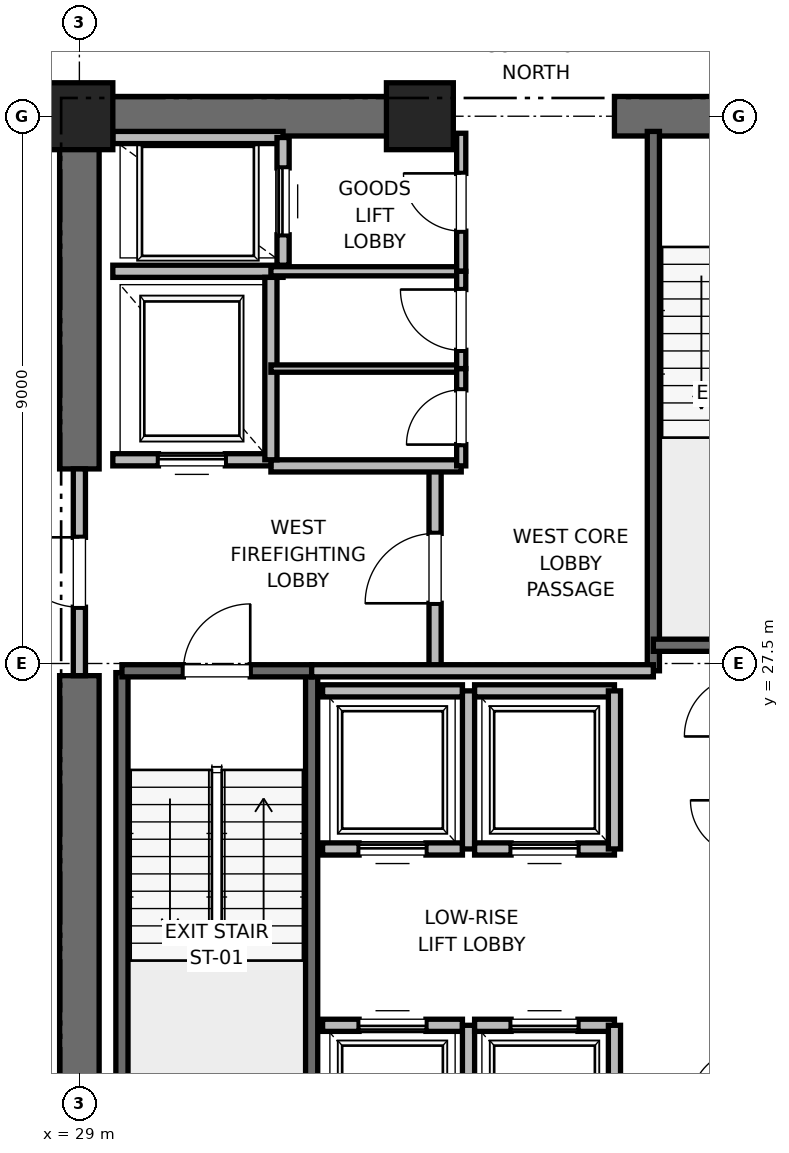
"""IFC4 building model, lengths in metres.
Left out: names, types, materials, properties, quantities, classifications, styles, units other than length and angle.
Written with IfcOpenShell. Run it as: python <this file> out.ifc"""

import sys

from ifc_helpers import new_model, si_unit, direction, frame, frame_2d, origin, origin_2d, place, context, subcontext, project, spatial, rectangle, extrude, element, fill, save


model = new_model("IFC4")
c1 = context("Model", 3, precision=1e-05, world=origin(), true_north=direction((0.0, 1.0)))
c2 = subcontext(c1, "Body", "Model", "MODEL_VIEW")
j1 = project(units=[si_unit("LENGTHUNIT", "METRE"), si_unit("PLANEANGLEUNIT", "RADIAN")], contexts=[c1])
p1 = place(None, origin())
s1 = spatial("IfcSite", under=j1, at=p1, CompositionType="ELEMENT")
p2 = place(p1, origin())
s2 = spatial("IfcBuilding", under=s1, at=p2, CompositionType="ELEMENT")
p3 = place(p2, frame((0.0, 0.0, 99.6)))
s3 = spatial("IfcBuildingStorey", under=s2, at=p3, CompositionType="ELEMENT", Elevation=99.6)
for number, where, z_axis, x_axis in (
    (1, (29.0, 36.5, 0.0), (0.0, 0.0, 1.0), (1.0, 0.0, 0.0)),
    (2, (34.6, 36.5, 0.0), (0.0, 0.0, 1.0), (1.0, 0.0, 0.0)),
):
    element("IfcColumn", number, at=place(p3, frame(where, z_axis=z_axis, x_axis=x_axis)), inside=s3, PredefinedType="PILASTER", context=c2, shape_type="SweptSolid", body=[
        extrude(rectangle(XDim=1.1, YDim=1.1, at=origin_2d()), origin(), (0.0, 0.0, 1.0), 4.0),
    ])
p4 = place(p3, frame((29.0, 36.5, 0.0), z_axis=(0.0, 0.0, 1.0), x_axis=(1.0, 0.0, 0.0)))
e3 = element("IfcWall", 3, at=p4, inside=s3, PredefinedType="SHEAR", context=c2, shape_type="SweptSolid", body=[
    extrude(rectangle(XDim=5.8, YDim=0.65, at=frame_2d((2.9, 0.0))), origin(), (0.0, 0.0, 1.0), 3.76),
])
p5 = place(p3, frame((37.8, 36.5, 0.0), z_axis=(0.0, 0.0, 1.0), x_axis=(1.0, 0.0, 0.0)))
e4 = element("IfcWall", 4, at=p5, inside=s3, PredefinedType="SHEAR", context=c2, shape_type="SweptSolid", body=[
    extrude(rectangle(XDim=4.4, YDim=0.65, at=frame_2d((2.2, 0.0))), origin(), (0.0, 0.0, 1.0), 3.76),
])
p6 = place(p5, frame((1.65, 0.0, 0.0)))
e5 = element("IfcOpeningElement", 5, at=p6, cuts=e4, PredefinedType="OPENING", context=c2, shape_type="SweptSolid", body=[
    extrude(rectangle(XDim=1.1, YDim=2.15, at=frame_2d((0.55, 1.075))), frame((0.0, 0.325, 0.0), z_axis=(0.0, -1.0, 0.0), x_axis=(1.0, 0.0, 0.0)), (0.0, 0.0, 1.0), 0.65),
])
p7 = place(p3, frame((29.0, 18.5, 0.0), z_axis=(0.0, 0.0, 1.0), x_axis=(0.0, 1.0, 0.0)))
e6 = element("IfcWall", 6, at=p7, inside=s3, PredefinedType="SHEAR", context=c2, shape_type="SweptSolid", body=[
    extrude(rectangle(XDim=8.8, YDim=0.65, at=frame_2d((4.4, 0.0))), origin(), (0.0, 0.0, 1.0), 3.76),
])
p8 = place(p3, frame((29.0, 30.7, 0.0), z_axis=(0.0, 0.0, 1.0), x_axis=(0.0, 1.0, 0.0)))
e7 = element("IfcWall", 7, at=p8, inside=s3, PredefinedType="SHEAR", context=c2, shape_type="SweptSolid", body=[
    extrude(rectangle(XDim=5.8, YDim=0.65, at=frame_2d((2.9, 0.0))), origin(), (0.0, 0.0, 1.0), 3.76),
])
p9 = place(p3, frame((29.7, 19.2, 0.0), z_axis=(0.0, 0.0, 1.0), x_axis=(0.0, 1.0, 0.0)))
e8 = element("IfcWall", 8, at=p9, inside=s3, PredefinedType="SOLIDWALL", context=c2, shape_type="SweptSolid", body=[
    extrude(rectangle(XDim=8.15, YDim=0.2, at=frame_2d((4.075, 0.0))), origin(), (0.0, 0.0, 1.0), 3.76),
])
p10 = place(p3, frame((32.82, 18.6, 0.0), z_axis=(0.0, 0.0, 1.0), x_axis=(0.0, 1.0, 0.0)))
e9 = element("IfcWall", 9, at=p10, inside=s3, PredefinedType="SOLIDWALL", context=c2, shape_type="SweptSolid", body=[
    extrude(rectangle(XDim=8.78, YDim=0.2, at=frame_2d((4.39, 0.0))), origin(), (0.0, 0.0, 1.0), 3.76),
])
p11 = place(p3, frame((29.7, 27.38, 0.0), z_axis=(0.0, 0.0, 1.0), x_axis=(1.0, 0.0, 0.0)))
e10 = element("IfcWall", 10, at=p11, inside=s3, PredefinedType="SOLIDWALL", context=c2, shape_type="SweptSolid", body=[
    extrude(rectangle(XDim=3.12, YDim=0.2, at=frame_2d((1.56, 0.0))), origin(), (0.0, 0.0, 1.0), 3.76),
])
p12 = place(p11, frame((1.01, 0.0, 0.0)))
e11 = element("IfcOpeningElement", 11, at=p12, cuts=e10, PredefinedType="OPENING", context=c2, shape_type="SweptSolid", body=[
    extrude(rectangle(XDim=1.1, YDim=2.15, at=frame_2d((0.55, 1.075))), frame((0.0, 0.1, 0.0), z_axis=(0.0, -1.0, 0.0), x_axis=(1.0, 0.0, 0.0)), (0.0, 0.0, 1.0), 0.2),
])
p13 = place(p3, frame((38.44, 27.38, 0.0), z_axis=(0.0, 0.0, 1.0), x_axis=(0.0, 1.0, 0.0)))
e12 = element("IfcWall", 12, at=p13, inside=s3, PredefinedType="SOLIDWALL", context=c2, shape_type="SweptSolid", body=[
    extrude(rectangle(XDim=8.87, YDim=0.2, at=frame_2d((4.435, 0.0))), origin(), (0.0, 0.0, 1.0), 3.76),
])
p14 = place(p3, frame((38.44, 27.8, 0.0), z_axis=(0.0, 0.0, 1.0), x_axis=(1.0, 0.0, 0.0)))
e13 = element("IfcWall", 13, at=p14, inside=s3, PredefinedType="SOLIDWALL", context=c2, shape_type="SweptSolid", body=[
    extrude(rectangle(XDim=3.32, YDim=0.2, at=frame_2d((1.66, 0.0))), origin(), (0.0, 0.0, 1.0), 3.76),
])
p15 = place(p3, frame((34.85, 27.38, 0.0), z_axis=(0.0, 0.0, 1.0), x_axis=(0.0, 1.0, 0.0)))
e14 = element("IfcWall", 14, at=p15, inside=s3, PredefinedType="PARTITIONING", context=c2, shape_type="SweptSolid", body=[
    extrude(rectangle(XDim=3.37, YDim=0.2, at=frame_2d((1.685, 0.0))), origin(), (0.0, 0.0, 1.0), 3.76),
])
p16 = place(p15, frame((1.11, 0.0, 0.0)))
e15 = element("IfcOpeningElement", 15, at=p16, cuts=e14, PredefinedType="OPENING", context=c2, shape_type="SweptSolid", body=[
    extrude(rectangle(XDim=1.15, YDim=2.2, at=frame_2d((0.575, 1.1))), frame((0.0, 0.1, 0.0), z_axis=(0.0, -1.0, 0.0), x_axis=(1.0, 0.0, 0.0)), (0.0, 0.0, 1.0), 0.2),
])
p17 = place(p3, frame((29.0, 27.3, 0.0), z_axis=(0.0, 0.0, 1.0), x_axis=(0.0, 1.0, 0.0)))
e16 = element("IfcWall", 16, at=p17, inside=s3, PredefinedType="PARTITIONING", context=c2, shape_type="SweptSolid", body=[
    extrude(rectangle(XDim=3.4, YDim=0.2, at=frame_2d((1.7, 0.0))), origin(), (0.0, 0.0, 1.0), 2.54),
])
p18 = place(p17, frame((1.125, 0.0, 0.0)))
e17 = element("IfcOpeningElement", 17, at=p18, cuts=e16, PredefinedType="OPENING", context=c2, shape_type="SweptSolid", body=[
    extrude(rectangle(XDim=1.15, YDim=2.2, at=frame_2d((0.575, 1.1))), frame((0.0, 0.1, 0.0), z_axis=(0.0, -1.0, 0.0), x_axis=(1.0, 0.0, 0.0)), (0.0, 0.0, 1.0), 0.2),
])
p19 = place(p3, frame((32.82, 27.38, 0.0), z_axis=(0.0, 0.0, 1.0), x_axis=(1.0, 0.0, 0.0)))
e18 = element("IfcWall", 18, at=p19, inside=s3, PredefinedType="PARTITIONING", context=c2, shape_type="SweptSolid", body=[
    extrude(rectangle(XDim=5.62, YDim=0.2, at=frame_2d((2.81, 0.0))), origin(), (0.0, 0.0, 1.0), 3.76),
])
p20 = place(p3, frame((32.15, 30.75, 0.0), z_axis=(0.0, 0.0, 1.0), x_axis=(1.0, 0.0, 0.0)))
e19 = element("IfcWall", 19, at=p20, inside=s3, PredefinedType="PARTITIONING", context=c2, shape_type="SweptSolid", body=[
    extrude(rectangle(XDim=3.13, YDim=0.2, at=frame_2d((1.565, 0.0))), origin(), (0.0, 0.0, 1.0), 3.76),
])
p21 = place(p3, frame((29.55, 30.85, 0.0), z_axis=(0.0, 0.0, 1.0), x_axis=(1.0, 0.0, 0.0)))
e20 = element("IfcWall", 20, at=p21, inside=s3, PredefinedType="SOLIDWALL", context=c2, shape_type="SweptSolid", body=[
    extrude(rectangle(XDim=2.6, YDim=0.2, at=frame_2d((1.3, 0.0))), origin(), (0.0, 0.0, 1.0), 2.54),
])
p22 = place(p21, frame((0.75, 0.0, 0.0)))
e21 = element("IfcOpeningElement", 21, at=p22, cuts=e20, PredefinedType="OPENING", context=c2, shape_type="SweptSolid", body=[
    extrude(rectangle(XDim=1.1, YDim=2.2, at=frame_2d((0.55, 1.1))), frame((0.0, 0.1, 0.0), z_axis=(0.0, -1.0, 0.0), x_axis=(1.0, 0.0, 0.0)), (0.0, 0.0, 1.0), 0.2),
])
p23 = place(p3, frame((29.55, 33.95, 0.0), z_axis=(0.0, 0.0, 1.0), x_axis=(1.0, 0.0, 0.0)))
e22 = element("IfcWall", 22, at=p23, inside=s3, PredefinedType="SOLIDWALL", context=c2, shape_type="SweptSolid", body=[
    extrude(rectangle(XDim=2.8, YDim=0.2, at=frame_2d((1.4, 0.0))), origin(), (0.0, 0.0, 1.0), 3.76),
])
p24 = place(p3, frame((32.15, 30.85, 0.0), z_axis=(0.0, 0.0, 1.0), x_axis=(0.0, 1.0, 0.0)))
e23 = element("IfcWall", 23, at=p24, inside=s3, PredefinedType="SOLIDWALL", context=c2, shape_type="SweptSolid", body=[
    extrude(rectangle(XDim=3.0, YDim=0.2, at=frame_2d((1.5, 0.0))), origin(), (0.0, 0.0, 1.0), 3.76),
])
p25 = place(p3, frame((32.35, 36.15, 0.0), z_axis=(0.0, 0.0, 1.0), x_axis=(-1.0, 0.0, 0.0)))
e24 = element("IfcWall", 24, at=p25, inside=s3, PredefinedType="SOLIDWALL", context=c2, shape_type="SweptSolid", body=[
    extrude(rectangle(XDim=2.8, YDim=0.2, at=frame_2d((1.4, 0.0))), origin(), (0.0, 0.0, 1.0), 2.889),
])
p26 = place(p3, frame((32.35, 34.05, 0.0), z_axis=(0.0, 0.0, 1.0), x_axis=(0.0, 1.0, 0.0)))
e25 = element("IfcWall", 25, at=p26, inside=s3, PredefinedType="SOLIDWALL", context=c2, shape_type="SweptSolid", body=[
    extrude(rectangle(XDim=2.1, YDim=0.2, at=frame_2d((1.05, 0.0))), origin(), (0.0, 0.0, 1.0), 3.76),
])
p27 = place(p26, frame((0.5, 0.0, 0.0)))
e26 = element("IfcOpeningElement", 26, at=p27, cuts=e25, PredefinedType="OPENING", context=c2, shape_type="SweptSolid", body=[
    extrude(rectangle(XDim=1.1, YDim=2.2, at=frame_2d((0.55, 1.1))), frame((0.0, 0.1, 0.0), z_axis=(0.0, -1.0, 0.0), x_axis=(1.0, 0.0, 0.0)), (0.0, 0.0, 1.0), 0.2),
])
p28 = place(p3, frame((35.3, 21.55, 0.0), z_axis=(0.0, 0.0, 1.0), x_axis=(-1.0, 0.0, 0.0)))
e27 = element("IfcWall", 27, at=p28, inside=s3, PredefinedType="SOLIDWALL", context=c2, shape_type="SweptSolid", body=[
    extrude(rectangle(XDim=2.3, YDim=0.2, at=frame_2d((1.15, 0.0))), origin(), (0.0, 0.0, 1.0), 3.76),
])
p29 = place(p28, frame((0.6, 0.0, 0.0)))
e28 = element("IfcOpeningElement", 28, at=p29, cuts=e27, PredefinedType="OPENING", context=c2, shape_type="SweptSolid", body=[
    extrude(rectangle(XDim=1.1, YDim=2.2, at=frame_2d((0.55, 1.1))), frame((0.0, 0.1, 0.0), z_axis=(0.0, -1.0, 0.0), x_axis=(1.0, 0.0, 0.0)), (0.0, 0.0, 1.0), 0.2),
])
p30 = place(p3, frame((35.4, 18.95, 0.0), z_axis=(0.0, 0.0, 1.0), x_axis=(0.0, 1.0, 0.0)))
e29 = element("IfcWall", 29, at=p30, inside=s3, PredefinedType="SOLIDWALL", context=c2, shape_type="SweptSolid", body=[
    extrude(rectangle(XDim=2.6, YDim=0.2, at=frame_2d((1.3, 0.0))), origin(), (0.0, 0.0, 1.0), 3.76),
])
p31 = place(p3, frame((37.8, 21.55, 0.0), z_axis=(0.0, 0.0, 1.0), x_axis=(-1.0, 0.0, 0.0)))
e30 = element("IfcWall", 30, at=p31, inside=s3, PredefinedType="SOLIDWALL", context=c2, shape_type="SweptSolid", body=[
    extrude(rectangle(XDim=2.3, YDim=0.2, at=frame_2d((1.15, 0.0))), origin(), (0.0, 0.0, 1.0), 3.76),
])
p32 = place(p31, frame((0.6, 0.0, 0.0)))
e31 = element("IfcOpeningElement", 31, at=p32, cuts=e30, PredefinedType="OPENING", context=c2, shape_type="SweptSolid", body=[
    extrude(rectangle(XDim=1.1, YDim=2.2, at=frame_2d((0.55, 1.1))), frame((0.0, 0.1, 0.0), z_axis=(0.0, -1.0, 0.0), x_axis=(1.0, 0.0, 0.0)), (0.0, 0.0, 1.0), 0.2),
])
p33 = place(p3, frame((37.8, 18.95, 0.0), z_axis=(0.0, 0.0, 1.0), x_axis=(0.0, 1.0, 0.0)))
e32 = element("IfcWall", 32, at=p33, inside=s3, PredefinedType="SOLIDWALL", context=c2, shape_type="SweptSolid", body=[
    extrude(rectangle(XDim=2.6, YDim=0.2, at=frame_2d((1.3, 0.0))), origin(), (0.0, 0.0, 1.0), 2.54),
])
p34 = place(p3, frame((33.0, 24.45, 0.0), z_axis=(0.0, 0.0, 1.0), x_axis=(1.0, 0.0, 0.0)))
e33 = element("IfcWall", 33, at=p34, inside=s3, PredefinedType="SOLIDWALL", context=c2, shape_type="SweptSolid", body=[
    extrude(rectangle(XDim=2.3, YDim=0.2, at=frame_2d((1.15, 0.0))), origin(), (0.0, 0.0, 1.0), 3.76),
])
p35 = place(p34, frame((0.6, 0.0, 0.0)))
e34 = element("IfcOpeningElement", 34, at=p35, cuts=e33, PredefinedType="OPENING", context=c2, shape_type="SweptSolid", body=[
    extrude(rectangle(XDim=1.1, YDim=2.2, at=frame_2d((0.55, 1.1))), frame((0.0, 0.1, 0.0), z_axis=(0.0, -1.0, 0.0), x_axis=(1.0, 0.0, 0.0)), (0.0, 0.0, 1.0), 0.2),
])
p36 = place(p3, frame((35.3, 27.05, 0.0), z_axis=(0.0, 0.0, 1.0), x_axis=(-1.0, 0.0, 0.0)))
e35 = element("IfcWall", 35, at=p36, inside=s3, PredefinedType="SOLIDWALL", context=c2, shape_type="SweptSolid", body=[
    extrude(rectangle(XDim=2.3, YDim=0.2, at=frame_2d((1.15, 0.0))), origin(), (0.0, 0.0, 1.0), 3.76),
])
p37 = place(p3, frame((35.4, 24.45, 0.0), z_axis=(0.0, 0.0, 1.0), x_axis=(0.0, 1.0, 0.0)))
e36 = element("IfcWall", 36, at=p37, inside=s3, PredefinedType="SOLIDWALL", context=c2, shape_type="SweptSolid", body=[
    extrude(rectangle(XDim=2.6, YDim=0.2, at=frame_2d((1.3, 0.0))), origin(), (0.0, 0.0, 1.0), 3.76),
])
p38 = place(p3, frame((35.5, 24.45, 0.0), z_axis=(0.0, 0.0, 1.0), x_axis=(1.0, 0.0, 0.0)))
e37 = element("IfcWall", 37, at=p38, inside=s3, PredefinedType="SOLIDWALL", context=c2, shape_type="SweptSolid", body=[
    extrude(rectangle(XDim=2.3, YDim=0.2, at=frame_2d((1.15, 0.0))), origin(), (0.0, 0.0, 1.0), 3.76),
])
p39 = place(p38, frame((0.6, 0.0, 0.0)))
e38 = element("IfcOpeningElement", 38, at=p39, cuts=e37, PredefinedType="OPENING", context=c2, shape_type="SweptSolid", body=[
    extrude(rectangle(XDim=1.1, YDim=2.2, at=frame_2d((0.55, 1.1))), frame((0.0, 0.1, 0.0), z_axis=(0.0, -1.0, 0.0), x_axis=(1.0, 0.0, 0.0)), (0.0, 0.0, 1.0), 0.2),
])
p40 = place(p3, frame((37.8, 27.05, 0.0), z_axis=(0.0, 0.0, 1.0), x_axis=(-1.0, 0.0, 0.0)))
e39 = element("IfcWall", 39, at=p40, inside=s3, PredefinedType="SOLIDWALL", context=c2, shape_type="SweptSolid", body=[
    extrude(rectangle(XDim=2.3, YDim=0.2, at=frame_2d((1.15, 0.0))), origin(), (0.0, 0.0, 1.0), 3.76),
])
p41 = place(p3, frame((37.8, 24.45, 0.0), z_axis=(0.0, 0.0, 1.0), x_axis=(0.0, 1.0, 0.0)))
e40 = element("IfcWall", 40, at=p41, inside=s3, PredefinedType="SOLIDWALL", context=c2, shape_type="SweptSolid", body=[
    extrude(rectangle(XDim=2.6, YDim=0.2, at=frame_2d((1.3, 0.0))), origin(), (0.0, 0.0, 1.0), 3.76),
])
p42 = place(p3, frame((32.15, 33.95, 0.0), z_axis=(0.0, 0.0, 1.0), x_axis=(1.0, 0.0, 0.0)))
e41 = element("IfcWall", 41, at=p42, inside=s3, PredefinedType="PARTITIONING", context=c2, shape_type="SweptSolid", body=[
    extrude(rectangle(XDim=3.13, YDim=0.15, at=frame_2d((1.565, 0.0))), origin(), (0.0, 0.0, 1.0), 2.85),
])
p43 = place(p3, frame((35.28, 33.95, 0.0), z_axis=(0.0, 0.0, 1.0), x_axis=(0.0, 1.0, 0.0)))
e42 = element("IfcWall", 42, at=p43, inside=s3, PredefinedType="PARTITIONING", context=c2, shape_type="SweptSolid", body=[
    extrude(rectangle(XDim=2.27, YDim=0.15, at=frame_2d((1.135, 0.0))), origin(), (0.0, 0.0, 1.0), 2.54),
])
p44 = place(p43, frame((0.66, 0.0, 0.0)))
e43 = element("IfcOpeningElement", 43, at=p44, cuts=e42, PredefinedType="OPENING", context=c2, shape_type="SweptSolid", body=[
    extrude(rectangle(XDim=0.95, YDim=2.15, at=frame_2d((0.475, 1.075))), frame((0.0, 0.075, 0.0), z_axis=(0.0, -1.0, 0.0), x_axis=(1.0, 0.0, 0.0)), (0.0, 0.0, 1.0), 0.15),
])
p45 = place(p3, frame((32.15, 32.35, 0.0), z_axis=(0.0, 0.0, 1.0), x_axis=(1.0, 0.0, 0.0)))
e44 = element("IfcWall", 44, at=p45, inside=s3, PredefinedType="PARTITIONING", context=c2, shape_type="SweptSolid", body=[
    extrude(rectangle(XDim=3.13, YDim=0.12, at=frame_2d((1.565, 0.0))), origin(), (0.0, 0.0, 1.0), 2.85),
])
p46 = place(p3, frame((35.28, 30.75, 0.0), z_axis=(0.0, 0.0, 1.0), x_axis=(0.0, 1.0, 0.0)))
e45 = element("IfcWall", 45, at=p46, inside=s3, PredefinedType="PARTITIONING", context=c2, shape_type="SweptSolid", body=[
    extrude(rectangle(XDim=1.6, YDim=0.15, at=frame_2d((0.8, 0.0))), origin(), (0.0, 0.0, 1.0), 2.85),
])
p47 = place(p46, frame((0.35, 0.0, 0.0)))
e46 = element("IfcOpeningElement", 46, at=p47, cuts=e45, PredefinedType="OPENING", context=c2, shape_type="SweptSolid", body=[
    extrude(rectangle(XDim=0.9, YDim=2.1, at=frame_2d((0.45, 1.05))), frame((0.0, 0.075, 0.0), z_axis=(0.0, -1.0, 0.0), x_axis=(1.0, 0.0, 0.0)), (0.0, 0.0, 1.0), 0.15),
])
p48 = place(p3, frame((35.28, 32.35, 0.0), z_axis=(0.0, 0.0, 1.0), x_axis=(0.0, 1.0, 0.0)))
e47 = element("IfcWall", 47, at=p48, inside=s3, PredefinedType="PARTITIONING", context=c2, shape_type="SweptSolid", body=[
    extrude(rectangle(XDim=1.6, YDim=0.15, at=frame_2d((0.8, 0.0))), origin(), (0.0, 0.0, 1.0), 2.85),
])
p49 = place(p48, frame((0.3, 0.0, 0.0)))
e48 = element("IfcOpeningElement", 48, at=p49, cuts=e47, PredefinedType="OPENING", context=c2, shape_type="SweptSolid", body=[
    extrude(rectangle(XDim=1.0, YDim=2.15, at=frame_2d((0.5, 1.075))), frame((0.0, 0.075, 0.0), z_axis=(0.0, -1.0, 0.0), x_axis=(1.0, 0.0, 0.0)), (0.0, 0.0, 1.0), 0.15),
])
p50 = place(p12, origin())
e49 = element("IfcDoor", 49, at=p50, inside=s3, OperationType="SINGLE_SWING_RIGHT", PredefinedType="DOOR", context=c2, shape_type="SweptSolid", body=[
    extrude(rectangle(XDim=1.1, YDim=2.15, at=frame_2d((0.55, 1.075))), frame((0.0, 0.025, 0.0), z_axis=(0.0, -1.0, 0.0), x_axis=(1.0, 0.0, 0.0)), (0.0, 0.0, 1.0), 0.05),
])
fill(e11, e49)
p51 = place(p16, origin())
e50 = element("IfcDoor", 50, at=p51, inside=s3, OperationType="SINGLE_SWING_LEFT", PredefinedType="DOOR", context=c2, shape_type="SweptSolid", body=[
    extrude(rectangle(XDim=1.15, YDim=2.2, at=frame_2d((0.575, 1.1))), frame((0.0, 0.025, 0.0), z_axis=(0.0, -1.0, 0.0), x_axis=(1.0, 0.0, 0.0)), (0.0, 0.0, 1.0), 0.05),
])
fill(e15, e50)
p52 = place(p18, origin())
e51 = element("IfcDoor", 51, at=p52, inside=s3, OperationType="SINGLE_SWING_RIGHT", PredefinedType="DOOR", context=c2, shape_type="SweptSolid", body=[
    extrude(rectangle(XDim=1.15, YDim=2.2, at=frame_2d((0.575, 1.1))), frame((0.0, 0.025, 0.0), z_axis=(0.0, -1.0, 0.0), x_axis=(1.0, 0.0, 0.0)), (0.0, 0.0, 1.0), 0.05),
])
fill(e17, e51)
p53 = place(p22, origin())
e52 = element("IfcDoor", 52, at=p53, inside=s3, OperationType="SLIDING_TO_RIGHT", PredefinedType="DOOR", context=c2, shape_type="SweptSolid", body=[
    extrude(rectangle(XDim=1.1, YDim=2.2, at=frame_2d((0.55, 1.1))), frame((0.0, 0.025, 0.0), z_axis=(0.0, -1.0, 0.0), x_axis=(1.0, 0.0, 0.0)), (0.0, 0.0, 1.0), 0.05),
])
fill(e21, e52)
p54 = place(p27, origin())
e53 = element("IfcDoor", 53, at=p54, inside=s3, OperationType="SLIDING_TO_RIGHT", PredefinedType="DOOR", context=c2, shape_type="SweptSolid", body=[
    extrude(rectangle(XDim=1.1, YDim=2.2, at=frame_2d((0.55, 1.1))), frame((0.0, 0.025, 0.0), z_axis=(0.0, -1.0, 0.0), x_axis=(1.0, 0.0, 0.0)), (0.0, 0.0, 1.0), 0.05),
])
fill(e26, e53)
p55 = place(p29, origin())
e54 = element("IfcDoor", 54, at=p55, inside=s3, OperationType="SLIDING_TO_RIGHT", PredefinedType="DOOR", context=c2, shape_type="SweptSolid", body=[
    extrude(rectangle(XDim=1.1, YDim=2.2, at=frame_2d((0.55, 1.1))), frame((0.0, 0.025, 0.0), z_axis=(0.0, -1.0, 0.0), x_axis=(1.0, 0.0, 0.0)), (0.0, 0.0, 1.0), 0.05),
])
fill(e28, e54)
p56 = place(p32, origin())
e55 = element("IfcDoor", 55, at=p56, inside=s3, OperationType="SLIDING_TO_RIGHT", PredefinedType="DOOR", context=c2, shape_type="SweptSolid", body=[
    extrude(rectangle(XDim=1.1, YDim=2.2, at=frame_2d((0.55, 1.1))), frame((0.0, 0.025, 0.0), z_axis=(0.0, -1.0, 0.0), x_axis=(1.0, 0.0, 0.0)), (0.0, 0.0, 1.0), 0.05),
])
fill(e31, e55)
p57 = place(p35, origin())
e56 = element("IfcDoor", 56, at=p57, inside=s3, OperationType="SLIDING_TO_RIGHT", PredefinedType="DOOR", context=c2, shape_type="SweptSolid", body=[
    extrude(rectangle(XDim=1.1, YDim=2.2, at=frame_2d((0.55, 1.1))), frame((0.0, 0.025, 0.0), z_axis=(0.0, -1.0, 0.0), x_axis=(1.0, 0.0, 0.0)), (0.0, 0.0, 1.0), 0.05),
])
fill(e34, e56)
p58 = place(p39, origin())
e57 = element("IfcDoor", 57, at=p58, inside=s3, OperationType="SLIDING_TO_RIGHT", PredefinedType="DOOR", context=c2, shape_type="SweptSolid", body=[
    extrude(rectangle(XDim=1.1, YDim=2.2, at=frame_2d((0.55, 1.1))), frame((0.0, 0.025, 0.0), z_axis=(0.0, -1.0, 0.0), x_axis=(1.0, 0.0, 0.0)), (0.0, 0.0, 1.0), 0.05),
])
fill(e38, e57)
p59 = place(p44, origin())
e58 = element("IfcDoor", 58, at=p59, inside=s3, OperationType="SINGLE_SWING_RIGHT", PredefinedType="DOOR", context=c2, shape_type="SweptSolid", body=[
    extrude(rectangle(XDim=0.95, YDim=2.15, at=frame_2d((0.475, 1.075))), frame((0.0, 0.025, 0.0), z_axis=(0.0, -1.0, 0.0), x_axis=(1.0, 0.0, 0.0)), (0.0, 0.0, 1.0), 0.05),
])
fill(e43, e58)
p60 = place(p47, origin())
e59 = element("IfcDoor", 59, at=p60, inside=s3, OperationType="SINGLE_SWING_LEFT", PredefinedType="DOOR", context=c2, shape_type="SweptSolid", body=[
    extrude(rectangle(XDim=0.9, YDim=2.1, at=frame_2d((0.45, 1.05))), frame((0.0, 0.025, 0.0), z_axis=(0.0, -1.0, 0.0), x_axis=(1.0, 0.0, 0.0)), (0.0, 0.0, 1.0), 0.05),
])
fill(e46, e59)
p61 = place(p49, origin())
e60 = element("IfcDoor", 60, at=p61, inside=s3, OperationType="SINGLE_SWING_RIGHT", PredefinedType="DOOR", context=c2, shape_type="SweptSolid", body=[
    extrude(rectangle(XDim=1.0, YDim=2.15, at=frame_2d((0.5, 1.075))), frame((0.0, 0.025, 0.0), z_axis=(0.0, -1.0, 0.0), x_axis=(1.0, 0.0, 0.0)), (0.0, 0.0, 1.0), 0.05),
])
fill(e48, e60)
save(model, sys.argv[1])
